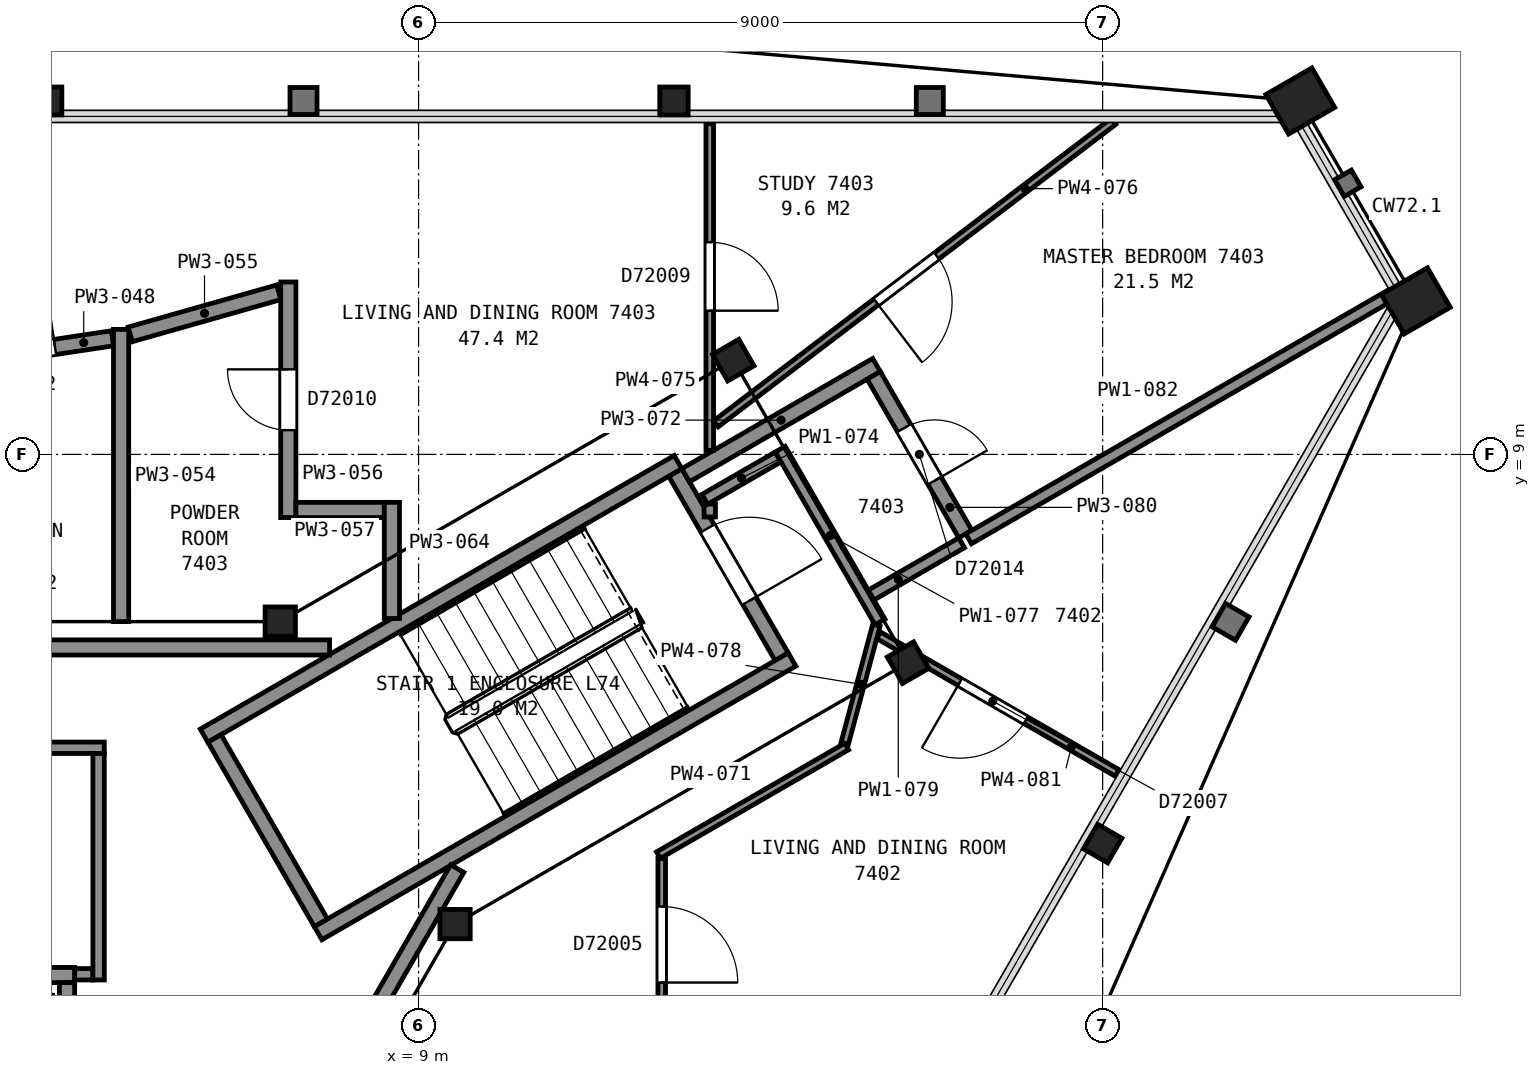
"""IFC4 building model, lengths in metres.
Left out: names, types, materials, properties, quantities, classifications, styles, units other than length and angle.
Written with IfcOpenShell. Run it as: python <this file> out.ifc"""

import sys

from ifc_helpers import new_model, si_unit, direction, frame, frame_2d, origin, origin_2d, place, context, subcontext, project, spatial, rectangle, hollow_rectangle, i_section, extrude, element, fill, save


model = new_model("IFC4")
c1 = context("Model", 3, precision=1e-05, world=origin(), true_north=direction((0.0, 1.0)))
c2 = subcontext(c1, "Body", "Model", "MODEL_VIEW")
j1 = project(units=[si_unit("LENGTHUNIT", "METRE"), si_unit("PLANEANGLEUNIT", "RADIAN")], contexts=[c1])
p1 = place(None, origin())
s1 = spatial("IfcSite", under=j1, at=p1, CompositionType="ELEMENT")
p2 = place(p1, origin())
s2 = spatial("IfcBuilding", under=s1, at=p2, CompositionType="ELEMENT")
p3 = place(p2, frame((0.0, 0.0, 293.6)))
s3 = spatial("IfcBuildingStorey", under=s2, at=p3, CompositionType="ELEMENT", Elevation=293.6)
p4 = place(p3, frame((20.6, 13.65, 0.0), z_axis=(0.0, 0.0, 1.0), x_axis=(0.5, -0.866025403784, 0.0)))
e1 = element("IfcColumn", 1, at=p4, inside=s3, PredefinedType="COLUMN", context=c2, shape_type="SweptSolid", body=[
    extrude(hollow_rectangle(XDim=0.6, YDim=0.7, WallThickness=0.04, at=origin_2d()), origin(), (0.0, 0.0, 1.0), 3.7),
])
for number, where, z_axis, x_axis in (
    (2, (12.36, 13.65, 0.0), (0.0, 0.0, 1.0), (1.0, 0.0, 0.0)),
    (3, (4.12, 13.65, 0.0), (0.0, 0.0, 1.0), (1.0, 0.0, 0.0)),
    (4, (18.0, 3.88, 0.0), (0.0, 0.0, 1.0), (-0.5, -0.866, 0.0)),
):
    element("IfcColumn", number, at=place(p3, frame(where, z_axis=z_axis, x_axis=x_axis)), inside=s3, PredefinedType="COLUMN", context=c2, shape_type="SweptSolid", body=[
        extrude(i_section(OverallWidth=0.373, OverallDepth=0.368, WebThickness=0.015, FlangeThickness=0.024, FilletRadius=0.015, at=origin_2d()), origin(), (0.0, 0.0, 1.0), 3.7),
    ])
p5 = place(p3, frame((22.12, 11.02, 0.0), z_axis=(0.0, 0.0, 1.0), x_axis=(0.5, -0.866025403784, 0.0)))
e5 = element("IfcColumn", 5, at=p5, inside=s3, PredefinedType="COLUMN", context=c2, shape_type="SweptSolid", body=[
    extrude(hollow_rectangle(XDim=0.6, YDim=0.7, WallThickness=0.04, at=origin_2d()), origin(), (0.0, 0.0, 1.0), 3.7),
])
p6 = place(p3, frame((9.48, 2.82, 0.0), z_axis=(0.0, 0.0, 1.0), x_axis=(1.0, 0.0, 0.0)))
e6 = element("IfcColumn", 6, at=p6, inside=s3, PredefinedType="COLUMN", context=c2, shape_type="SweptSolid", body=[
    extrude(i_section(OverallWidth=0.399, OverallDepth=0.386, WebThickness=0.021, FlangeThickness=0.033, FilletRadius=0.015, at=origin_2d()), origin(), (0.0, 0.0, 1.0), 3.7),
])
for number, where, z_axis, x_axis in (
    (7, (15.44, 6.26, 0.0), (0.0, 0.0, 1.0), (0.5, -0.866, 0.0)),
    (8, (13.14, 10.24, 0.0), (0.0, 0.0, 1.0), (0.5, -0.866, 0.0)),
):
    element("IfcColumn", number, at=place(p3, frame(where, z_axis=z_axis, x_axis=x_axis)), inside=s3, PredefinedType="COLUMN", context=c2, shape_type="SweptSolid", body=[
        extrude(i_section(OverallWidth=0.401, OverallDepth=0.399, WebThickness=0.025, FlangeThickness=0.04, FilletRadius=0.015, at=origin_2d()), origin(), (0.0, 0.0, 1.0), 3.7),
    ])
p7 = place(p3, frame((7.18, 6.8, 0.0), z_axis=(0.0, 0.0, 1.0), x_axis=(1.0, 0.0, 0.0)))
e9 = element("IfcColumn", 9, at=p7, inside=s3, PredefinedType="COLUMN", context=c2, shape_type="SweptSolid", body=[
    extrude(i_section(OverallWidth=0.399, OverallDepth=0.386, WebThickness=0.021, FlangeThickness=0.033, FilletRadius=0.015, at=origin_2d()), origin(), (0.0, 0.0, 1.0), 3.7),
])
p8 = place(p3, frame((13.777, 6.338, 0.0), z_axis=(0.0, 0.0, 1.0), x_axis=(-0.500049511043, 0.865996816683, 0.0)))
e10 = element("IfcWall", 10, at=p8, inside=s3, PredefinedType="PARTITIONING", context=c2, shape_type="SweptSolid", body=[
    extrude(rectangle(XDim=2.8, YDim=0.2, at=frame_2d((1.4, 0.0))), origin(), (0.0, 0.0, 1.0), 3.45),
])
p9 = place(p8, frame((0.85, 0.0, 0.0)))
e11 = element("IfcOpeningElement", 11, at=p9, cuts=e10, PredefinedType="OPENING", context=c2, shape_type="SweptSolid", body=[
    extrude(rectangle(XDim=1.1, YDim=2.1, at=frame_2d((0.55, 1.05))), frame((0.0, 0.11, 0.0), z_axis=(0.0, -1.0, 0.0), x_axis=(1.0, 0.0, 0.0)), (0.0, 0.0, 1.0), 0.22),
])
for number, where, z_axis, x_axis in (
    (12, (6.178, 5.299, 0.0), (0.0, 0.0, 1.0), (0.866, 0.5, 0.0)),
    (13, (7.678, 2.701, 0.0), (0.0, 0.0, 1.0), (0.866, 0.5, 0.0)),
):
    element("IfcWall", number, at=place(p3, frame(where, z_axis=z_axis, x_axis=x_axis)), inside=s3, PredefinedType="PARTITIONING", context=c2, shape_type="SweptSolid", body=[
        extrude(rectangle(XDim=7.2, YDim=0.2, at=frame_2d((3.6, 0.0))), origin(), (0.0, 0.0, 1.0), 3.45),
    ])
p10 = place(p3, frame((7.715, 2.838, 0.0), z_axis=(0.0, 0.0, 1.0), x_axis=(-0.500049511043, 0.865996816683, 0.0)))
e14 = element("IfcWall", 14, at=p10, inside=s3, PredefinedType="PARTITIONING", context=c2, shape_type="SweptSolid", body=[
    extrude(rectangle(XDim=2.8, YDim=0.2, at=frame_2d((1.4, 0.0))), origin(), (0.0, 0.0, 1.0), 3.45),
])
p11 = place(p3, frame((1.525, 2.15, 0.0), z_axis=(0.0, 0.0, 1.0), x_axis=(1.0, 0.0, 0.0)))
e15 = element("IfcWall", 15, at=p11, inside=s3, PredefinedType="PARTITIONING", context=c2, shape_type="SweptSolid", body=[
    extrude(rectangle(XDim=2.95, YDim=0.2, at=frame_2d((1.475, 0.0))), origin(), (0.0, 0.0, 1.0), 3.7),
])
p12 = place(p11, frame((0.925, 0.0, 0.0)))
e16 = element("IfcOpeningElement", 16, at=p12, cuts=e15, PredefinedType="OPENING", context=c2, shape_type="SweptSolid", body=[
    extrude(rectangle(XDim=1.1, YDim=2.1, at=frame_2d((0.55, 1.05))), frame((0.0, 0.11, 0.0), z_axis=(0.0, -1.0, 0.0), x_axis=(1.0, 0.0, 0.0)), (0.0, 0.0, 1.0), 0.22),
])
p13 = place(p3, frame((4.375, 0.1, 0.0), z_axis=(0.0, 0.0, 1.0), x_axis=(0.0, 1.0, 0.0)))
e17 = element("IfcWall", 17, at=p13, inside=s3, PredefinedType="PARTITIONING", context=c2, shape_type="SweptSolid", body=[
    extrude(rectangle(XDim=1.95, YDim=0.2, at=frame_2d((0.975, 0.0))), origin(), (0.0, 0.0, 1.0), 3.7),
])
p14 = place(p3, frame((7.829, 6.46, 0.0), z_axis=(0.0, 0.0, 1.0), x_axis=(-1.0, 0.0, 0.0)))
e18 = element("IfcWall", 18, at=p14, inside=s3, PredefinedType="PARTITIONING", context=c2, shape_type="SweptSolid", body=[
    extrude(rectangle(XDim=15.658, YDim=0.2, at=frame_2d((7.829, 0.0))), origin(), (0.0, 0.0, 1.0), 3.45),
])
p15 = place(p14, frame((12.168, 0.0, 0.0)))
e19 = element("IfcOpeningElement", 19, at=p15, cuts=e18, PredefinedType="OPENING", context=c2, shape_type="SweptSolid", body=[
    extrude(rectangle(XDim=1.2, YDim=2.1, at=frame_2d((0.6, 1.05))), frame((0.0, 0.11, 0.0), z_axis=(0.0, -1.0, 0.0), x_axis=(1.0, 0.0, 0.0)), (0.0, 0.0, 1.0), 0.22),
])
p16 = place(p3, frame((-0.245, 5.14, 0.0), z_axis=(0.0, 0.0, 1.0), x_axis=(1.0, 0.0, 0.0)))
e20 = element("IfcWall", 20, at=p16, inside=s3, PredefinedType="PARTITIONING", context=c2, shape_type="SweptSolid", body=[
    extrude(rectangle(XDim=5.11, YDim=0.15, at=frame_2d((2.555, 0.0))), origin(), (0.0, 0.0, 1.0), 3.45),
])
p17 = place(p16, frame((1.975, 0.0, 0.0)))
e21 = element("IfcOpeningElement", 21, at=p17, cuts=e20, PredefinedType="OPENING", context=c2, shape_type="SweptSolid", body=[
    extrude(rectangle(XDim=1.0, YDim=2.1, at=frame_2d((0.5, 1.05))), frame((0.0, 0.085, 0.0), z_axis=(0.0, -1.0, 0.0), x_axis=(1.0, 0.0, 0.0)), (0.0, 0.0, 1.0), 0.17),
])
p18 = place(p3, frame((3.828, -6.29, 0.0), z_axis=(0.0, 0.0, 1.0), x_axis=(0.499979739078, 0.866037101117, 0.0)))
e22 = element("IfcWall", 22, at=p18, inside=s3, PredefinedType="PARTITIONING", context=c2, shape_type="SweptSolid", body=[
    extrude(rectangle(XDim=11.363, YDim=0.2, at=frame_2d((5.681, 0.0))), origin(), (0.0, 0.0, 1.0), 3.45),
])
p19 = place(p18, frame((0.55, 0.0, 0.0)))
e23 = element("IfcOpeningElement", 23, at=p19, cuts=e22, PredefinedType="OPENING", context=c2, shape_type="SweptSolid", body=[
    extrude(rectangle(XDim=1.2, YDim=2.1, at=frame_2d((0.6, 1.05))), frame((0.0, 0.11, 0.0), z_axis=(0.0, -1.0, 0.0), x_axis=(1.0, 0.0, 0.0)), (0.0, 0.0, 1.0), 0.22),
])
p20 = place(p3, frame((4.477, 2.16, 0.0), z_axis=(0.0, 0.0, 1.0), x_axis=(1.0, 0.0, 0.0)))
e24 = element("IfcWall", 24, at=p20, inside=s3, PredefinedType="PARTITIONING", context=c2, shape_type="SweptSolid", body=[
    extrude(rectangle(XDim=0.238, YDim=0.15, at=frame_2d((0.119, 0.0))), origin(), (0.0, 0.0, 1.0), 3.45),
])
p21 = place(p3, frame((4.79, 2.085, 0.0), z_axis=(0.0, 0.0, 1.0), x_axis=(0.0, 1.0, 0.0)))
e25 = element("IfcWall", 25, at=p21, inside=s3, PredefinedType="PARTITIONING", context=c2, shape_type="SweptSolid", body=[
    extrude(rectangle(XDim=2.98, YDim=0.15, at=frame_2d((1.49, 0.0))), origin(), (0.0, 0.0, 1.0), 3.45),
])
p22 = place(p3, frame((4.972, 10.528, 0.0), z_axis=(0.0, 0.0, 1.0), x_axis=(-0.988827119235, -0.149066858374, 0.0)))
e26 = element("IfcWall", 26, at=p22, inside=s3, PredefinedType="PARTITIONING", context=c2, shape_type="SweptSolid", body=[
    extrude(rectangle(XDim=2.399, YDim=0.2, at=frame_2d((1.2, 0.0))), origin(), (0.0, 0.0, 1.0), 2.723),
])
p23 = place(p22, frame((0.764, 0.0, 0.0)))
e27 = element("IfcOpeningElement", 27, at=p23, cuts=e26, PredefinedType="OPENING", context=c2, shape_type="SweptSolid", body=[
    extrude(rectangle(XDim=0.9, YDim=2.1, at=frame_2d((0.45, 1.05))), frame((0.0, 0.11, 0.0), z_axis=(0.0, -1.0, 0.0), x_axis=(1.0, 0.0, 0.0)), (0.0, 0.0, 1.0), 0.22),
])
p24 = place(p3, frame((5.086, 6.8, 0.0), z_axis=(0.0, 0.0, 1.0), x_axis=(0.0, 1.0, 0.0)))
e28 = element("IfcWall", 28, at=p24, inside=s3, PredefinedType="PARTITIONING", context=c2, shape_type="SweptSolid", body=[
    extrude(rectangle(XDim=3.845, YDim=0.2, at=frame_2d((1.922, 0.0))), origin(), (0.0, 0.0, 1.0), 2.723),
])
p25 = place(p3, frame((5.206, 10.579, 0.0), z_axis=(0.0, 0.0, 1.0), x_axis=(0.962043687615, 0.272895480212, 0.0)))
e29 = element("IfcWall", 29, at=p25, inside=s3, PredefinedType="PARTITIONING", context=c2, shape_type="SweptSolid", body=[
    extrude(rectangle(XDim=2.032, YDim=0.2, at=frame_2d((1.016, 0.0))), origin(), (0.0, 0.0, 1.0), 2.723),
])
p26 = place(p3, frame((7.286, 8.169, 0.0), z_axis=(0.0, 0.0, 1.0), x_axis=(0.0, 1.0, 0.0)))
e30 = element("IfcWall", 30, at=p26, inside=s3, PredefinedType="PARTITIONING", context=c2, shape_type="SweptSolid", body=[
    extrude(rectangle(XDim=3.1, YDim=0.2, at=frame_2d((1.55, 0.0))), origin(), (0.0, 0.0, 1.0), 2.723),
])
p27 = place(p26, frame((1.15, 0.0, 0.0)))
e31 = element("IfcOpeningElement", 31, at=p27, cuts=e30, PredefinedType="OPENING", context=c2, shape_type="SweptSolid", body=[
    extrude(rectangle(XDim=0.8, YDim=2.1, at=frame_2d((0.4, 1.05))), frame((0.0, 0.11, 0.0), z_axis=(0.0, -1.0, 0.0), x_axis=(1.0, 0.0, 0.0)), (0.0, 0.0, 1.0), 0.22),
])
p28 = place(p3, frame((7.386, 8.269, 0.0), z_axis=(0.0, 0.0, 1.0), x_axis=(1.0, 0.0, 0.0)))
e32 = element("IfcWall", 32, at=p28, inside=s3, PredefinedType="PARTITIONING", context=c2, shape_type="SweptSolid", body=[
    extrude(rectangle(XDim=1.163, YDim=0.2, at=frame_2d((0.582, 0.0))), origin(), (0.0, 0.0, 1.0), 2.723),
])
p29 = place(p3, frame((8.649, 6.841, 0.0), z_axis=(0.0, 0.0, 1.0), x_axis=(0.0, 1.0, 0.0)))
e33 = element("IfcWall", 33, at=p29, inside=s3, PredefinedType="PARTITIONING", context=c2, shape_type="SweptSolid", body=[
    extrude(rectangle(XDim=1.528, YDim=0.2, at=frame_2d((0.764, 0.0))), origin(), (0.0, 0.0, 1.0), 2.723),
])
p30 = place(p3, frame((12.199, 3.682, 0.0), z_axis=(0.0, 0.0, 1.0), x_axis=(0.0, -1.0, 0.0)))
e34 = element("IfcWall", 34, at=p30, inside=s3, PredefinedType="PARTITIONING", context=c2, shape_type="SweptSolid", body=[
    extrude(rectangle(XDim=2.381, YDim=0.1, at=frame_2d((1.19, 0.0))), origin(), (0.0, 0.0, 1.0), 2.723),
])
p31 = place(p30, frame((0.631, 0.0, 0.0)))
e35 = element("IfcOpeningElement", 35, at=p31, cuts=e34, PredefinedType="OPENING", context=c2, shape_type="SweptSolid", body=[
    extrude(rectangle(XDim=1.0, YDim=2.1, at=frame_2d((0.5, 1.05))), frame((0.0, 0.06, 0.0), z_axis=(0.0, -1.0, 0.0), x_axis=(1.0, 0.0, 0.0)), (0.0, 0.0, 1.0), 0.12),
])
p32 = place(p3, frame((12.156, 3.727, 0.0), z_axis=(0.0, 0.0, 1.0), x_axis=(0.866012137121, 0.500022977831, 0.0)))
e36 = element("IfcWall", 36, at=p32, inside=s3, PredefinedType="PARTITIONING", context=c2, shape_type="SweptSolid", body=[
    extrude(rectangle(XDim=2.86, YDim=0.1, at=frame_2d((1.43, 0.0))), origin(), (0.0, 0.0, 1.0), 2.723),
])
p33 = place(p3, frame((12.514, 8.726, 0.0), z_axis=(0.0, 0.0, 1.0), x_axis=(0.865969617579, 0.500096612097, 0.0)))
e37 = element("IfcWall", 37, at=p33, inside=s3, PredefinedType="PARTITIONING", context=c2, shape_type="SweptSolid", body=[
    extrude(rectangle(XDim=2.899, YDim=0.2, at=frame_2d((1.45, 0.0))), origin(), (0.0, 0.0, 1.0), 2.723),
])
p34 = place(p3, frame((12.831, 8.177, 0.0), z_axis=(0.0, 0.0, 1.0), x_axis=(0.0, 1.0, 0.0)))
e38 = element("IfcWall", 38, at=p34, inside=s3, PredefinedType="PARTITIONING", context=c2, shape_type="SweptSolid", body=[
    extrude(rectangle(XDim=0.17, YDim=0.15, at=frame_2d((0.085, 0.0))), origin(), (0.0, 0.0, 1.0), 2.723),
])
p35 = place(p3, frame((12.766, 8.409, 0.0), z_axis=(0.0, 0.0, 1.0), x_axis=(0.865995823051, 0.500051231833, 0.0)))
e39 = element("IfcWall", 39, at=p35, inside=s3, PredefinedType="PARTITIONING", context=c2, shape_type="SweptSolid", body=[
    extrude(rectangle(XDim=1.114, YDim=0.15, at=frame_2d((0.557, 0.0))), origin(), (0.0, 0.0, 1.0), 2.723),
])
p36 = place(p3, frame((12.831, 13.351, 0.0), z_axis=(0.0, 0.0, 1.0), x_axis=(0.0, -1.0, 0.0)))
e40 = element("IfcWall", 40, at=p36, inside=s3, PredefinedType="PARTITIONING", context=c2, shape_type="SweptSolid", body=[
    extrude(rectangle(XDim=4.298, YDim=0.1, at=frame_2d((2.149, 0.0))), origin(), (0.0, 0.0, 1.0), 2.723),
])
p37 = place(p36, frame((1.56, 0.0, 0.0)))
e41 = element("IfcOpeningElement", 41, at=p37, cuts=e40, PredefinedType="OPENING", context=c2, shape_type="SweptSolid", body=[
    extrude(rectangle(XDim=0.9, YDim=2.1, at=frame_2d((0.45, 1.05))), frame((0.0, 0.06, 0.0), z_axis=(0.0, -1.0, 0.0), x_axis=(1.0, 0.0, 0.0)), (0.0, 0.0, 1.0), 0.12),
])
p38 = place(p3, frame((18.144, 13.383, 0.0), z_axis=(0.0, 0.0, 1.0), x_axis=(-0.795867985115, -0.605470189414, 0.0)))
e42 = element("IfcWall", 42, at=p38, inside=s3, PredefinedType="PARTITIONING", context=c2, shape_type="SweptSolid", body=[
    extrude(rectangle(XDim=6.574, YDim=0.1, at=frame_2d((3.287, 0.0))), origin(), (0.0, 0.0, 1.0), 2.723),
])
p39 = place(p38, frame((2.925, 0.0, 0.0)))
e43 = element("IfcOpeningElement", 43, at=p39, cuts=e42, PredefinedType="OPENING", context=c2, shape_type="SweptSolid", body=[
    extrude(rectangle(XDim=1.0, YDim=2.1, at=frame_2d((0.5, 1.05))), frame((0.0, 0.06, 0.0), z_axis=(0.0, -1.0, 0.0), x_axis=(1.0, 0.0, 0.0)), (0.0, 0.0, 1.0), 0.12),
])
p40 = place(p3, frame((13.759, 9.069, 0.0), z_axis=(0.0, 0.0, 1.0), x_axis=(0.500020344131, -0.866013657776, 0.0)))
e44 = element("IfcWall", 44, at=p40, inside=s3, PredefinedType="PARTITIONING", context=c2, shape_type="SweptSolid", body=[
    extrude(rectangle(XDim=2.625, YDim=0.15, at=frame_2d((1.312, 0.0))), origin(), (0.0, 0.0, 1.0), 2.723),
])
p41 = place(p3, frame((14.607, 5.2, 0.0), z_axis=(0.0, 0.0, 1.0), x_axis=(0.258589257768, 0.965987368327, 0.0)))
e45 = element("IfcWall", 45, at=p41, inside=s3, PredefinedType="PARTITIONING", context=c2, shape_type="SweptSolid", body=[
    extrude(rectangle(XDim=1.607, YDim=0.1, at=frame_2d((0.803, 0.0))), origin(), (0.0, 0.0, 1.0), 2.723),
])
p42 = place(p3, frame((14.954, 7.149, 0.0), z_axis=(0.0, 0.0, 1.0), x_axis=(0.865960792519, 0.5001118933, 0.0)))
e46 = element("IfcWall", 46, at=p42, inside=s3, PredefinedType="PARTITIONING", context=c2, shape_type="SweptSolid", body=[
    extrude(rectangle(XDim=1.375, YDim=0.15, at=frame_2d((0.688, 0.0))), origin(), (0.0, 0.0, 1.0), 2.723),
])
p43 = place(p3, frame((16.194, 7.952, 0.0), z_axis=(0.0, 0.0, 1.0), x_axis=(-0.500125724882, 0.865952804321, 0.0)))
e47 = element("IfcWall", 47, at=p43, inside=s3, PredefinedType="PARTITIONING", context=c2, shape_type="SweptSolid", body=[
    extrude(rectangle(XDim=2.411, YDim=0.2, at=frame_2d((1.205, 0.0))), origin(), (0.0, 0.0, 1.0), 2.723),
])
p44 = place(p43, frame((0.811, 0.0, 0.0)))
e48 = element("IfcOpeningElement", 48, at=p44, cuts=e47, PredefinedType="OPENING", context=c2, shape_type="SweptSolid", body=[
    extrude(rectangle(XDim=0.8, YDim=2.1, at=frame_2d((0.4, 1.05))), frame((0.0, 0.11, 0.0), z_axis=(0.0, -1.0, 0.0), x_axis=(1.0, 0.0, 0.0)), (0.0, 0.0, 1.0), 0.22),
])
p45 = place(p3, frame((15.052, 6.62, 0.0), z_axis=(0.0, 0.0, 1.0), x_axis=(0.866029693906, -0.499992569217, 0.0)))
e49 = element("IfcWall", 49, at=p45, inside=s3, PredefinedType="PARTITIONING", context=c2, shape_type="SweptSolid", body=[
    extrude(rectangle(XDim=3.625, YDim=0.1, at=frame_2d((1.812, 0.0))), origin(), (0.0, 0.0, 1.0), 2.723),
])
p46 = place(p45, frame((1.235, 0.0, 0.0)))
e50 = element("IfcOpeningElement", 50, at=p46, cuts=e49, PredefinedType="OPENING", context=c2, shape_type="SweptSolid", body=[
    extrude(rectangle(XDim=1.0, YDim=2.1, at=frame_2d((0.5, 1.05))), frame((0.0, 0.06, 0.0), z_axis=(0.0, -1.0, 0.0), x_axis=(1.0, 0.0, 0.0)), (0.0, 0.0, 1.0), 0.12),
])
p47 = place(p3, frame((16.236, 7.889, 0.0), z_axis=(0.0, 0.0, 1.0), x_axis=(0.865995456094, 0.500051867335, 0.0)))
e51 = element("IfcWall", 51, at=p47, inside=s3, PredefinedType="PARTITIONING", context=c2, shape_type="SweptSolid", body=[
    extrude(rectangle(XDim=6.415, YDim=0.15, at=frame_2d((3.208, 0.0))), origin(), (0.0, 0.0, 1.0), 2.723),
])
p48 = place(p9, origin())
e52 = element("IfcDoor", 52, at=p48, inside=s3, OperationType="SINGLE_SWING_LEFT", PredefinedType="DOOR", context=c2, shape_type="SweptSolid", body=[
    extrude(rectangle(XDim=1.1, YDim=2.1, at=frame_2d((0.55, 1.05))), frame((0.0, 0.025, 0.0), z_axis=(0.0, -1.0, 0.0), x_axis=(1.0, 0.0, 0.0)), (0.0, 0.0, 1.0), 0.05),
])
fill(e11, e52)
p49 = place(p23, origin())
e53 = element("IfcDoor", 53, at=p49, inside=s3, OperationType="SINGLE_SWING_LEFT", PredefinedType="DOOR", context=c2, shape_type="SweptSolid", body=[
    extrude(rectangle(XDim=0.9, YDim=2.1, at=frame_2d((0.45, 1.05))), frame((0.0, 0.025, 0.0), z_axis=(0.0, -1.0, 0.0), x_axis=(1.0, 0.0, 0.0)), (0.0, 0.0, 1.0), 0.05),
])
fill(e27, e53)
p50 = place(p27, origin())
e54 = element("IfcDoor", 54, at=p50, inside=s3, OperationType="SINGLE_SWING_RIGHT", PredefinedType="DOOR", context=c2, shape_type="SweptSolid", body=[
    extrude(rectangle(XDim=0.8, YDim=2.1, at=frame_2d((0.4, 1.05))), frame((0.0, 0.025, 0.0), z_axis=(0.0, -1.0, 0.0), x_axis=(1.0, 0.0, 0.0)), (0.0, 0.0, 1.0), 0.05),
])
fill(e31, e54)
p51 = place(p31, origin())
e55 = element("IfcDoor", 55, at=p51, inside=s3, OperationType="SINGLE_SWING_RIGHT", PredefinedType="DOOR", context=c2, shape_type="SweptSolid", body=[
    extrude(rectangle(XDim=1.0, YDim=2.1, at=frame_2d((0.5, 1.05))), frame((0.0, 0.025, 0.0), z_axis=(0.0, -1.0, 0.0), x_axis=(1.0, 0.0, 0.0)), (0.0, 0.0, 1.0), 0.05),
])
fill(e35, e55)
p52 = place(p37, origin())
e56 = element("IfcDoor", 56, at=p52, inside=s3, OperationType="SINGLE_SWING_RIGHT", PredefinedType="DOOR", context=c2, shape_type="SweptSolid", body=[
    extrude(rectangle(XDim=0.9, YDim=2.1, at=frame_2d((0.45, 1.05))), frame((0.0, 0.025, 0.0), z_axis=(0.0, -1.0, 0.0), x_axis=(1.0, 0.0, 0.0)), (0.0, 0.0, 1.0), 0.05),
])
fill(e41, e56)
p53 = place(p39, origin())
e57 = element("IfcDoor", 57, at=p53, inside=s3, OperationType="SINGLE_SWING_RIGHT", PredefinedType="DOOR", context=c2, shape_type="SweptSolid", body=[
    extrude(rectangle(XDim=1.0, YDim=2.1, at=frame_2d((0.5, 1.05))), frame((0.0, 0.025, 0.0), z_axis=(0.0, -1.0, 0.0), x_axis=(1.0, 0.0, 0.0)), (0.0, 0.0, 1.0), 0.05),
])
fill(e43, e57)
p54 = place(p44, origin())
e58 = element("IfcDoor", 58, at=p54, inside=s3, OperationType="SINGLE_SWING_LEFT", PredefinedType="DOOR", context=c2, shape_type="SweptSolid", body=[
    extrude(rectangle(XDim=0.8, YDim=2.1, at=frame_2d((0.4, 1.05))), frame((0.0, 0.025, 0.0), z_axis=(0.0, -1.0, 0.0), x_axis=(1.0, 0.0, 0.0)), (0.0, 0.0, 1.0), 0.05),
])
fill(e48, e58)
p55 = place(p46, origin())
e59 = element("IfcDoor", 59, at=p55, inside=s3, OperationType="SINGLE_SWING_LEFT", PredefinedType="DOOR", context=c2, shape_type="SweptSolid", body=[
    extrude(rectangle(XDim=1.0, YDim=2.1, at=frame_2d((0.5, 1.05))), frame((0.0, 0.025, 0.0), z_axis=(0.0, -1.0, 0.0), x_axis=(1.0, 0.0, 0.0)), (0.0, 0.0, 1.0), 0.05),
])
fill(e50, e59)
save(model, sys.argv[1])
